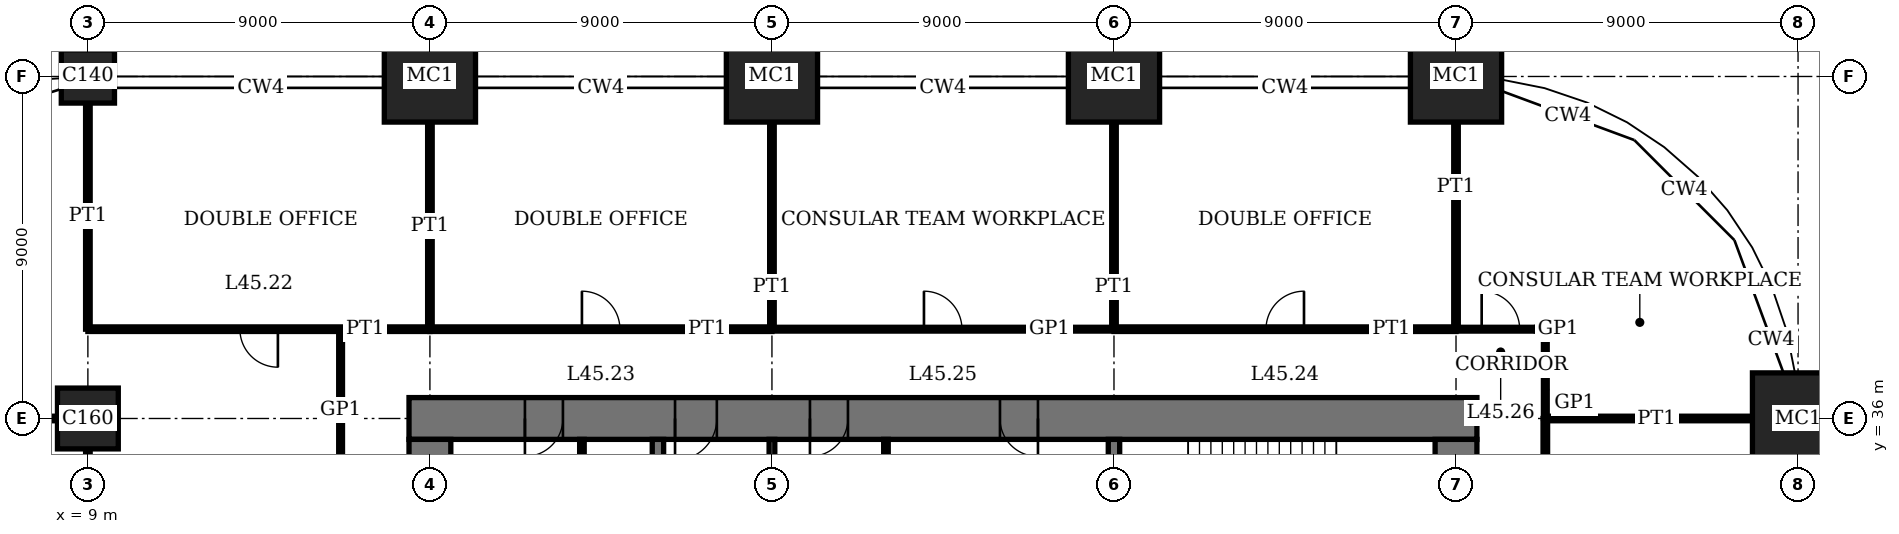
"""IFC4 building model, lengths in metres.
Left out: names, types, materials, properties, quantities, classifications, styles, units other than length and angle.
Written with IfcOpenShell. Run it as: python <this file> out.ifc"""

import sys

from ifc_helpers import new_model, si_unit, direction, frame, frame_2d, origin, origin_2d, place, context, subcontext, project, spatial, rectangle, extrude, element, fill, save


model = new_model("IFC4")
c1 = context("Model", 3, precision=1e-05, world=origin(), true_north=direction((0.0, 1.0)))
c2 = subcontext(c1, "Body", "Model", "MODEL_VIEW")
j1 = project(units=[si_unit("LENGTHUNIT", "METRE"), si_unit("PLANEANGLEUNIT", "RADIAN")], contexts=[c1])
p1 = place(None, origin())
s1 = spatial("IfcSite", under=j1, at=p1, CompositionType="ELEMENT")
p2 = place(p1, origin())
s2 = spatial("IfcBuilding", under=s1, at=p2, CompositionType="ELEMENT")
p3 = place(p2, frame((0.0, 0.0, 186.2)))
s3 = spatial("IfcBuildingStorey", under=s2, at=p3, CompositionType="ELEMENT", Elevation=186.2)
p4 = place(p3, frame((9.0, 36.0, 0.0), z_axis=(0.0, 0.0, 1.0), x_axis=(1.0, 0.0, 0.0)))
e1 = element("IfcColumn", 1, at=p4, inside=s3, PredefinedType="COLUMN", context=c2, shape_type="SweptSolid", body=[
    extrude(rectangle(XDim=1.6, YDim=1.6, at=origin_2d()), origin(), (0.0, 0.0, 1.0), 4.0),
])
p5 = place(p3, frame((9.0, 45.0, 0.0), z_axis=(0.0, 0.0, 1.0), x_axis=(1.0, 0.0, 0.0)))
e2 = element("IfcColumn", 2, at=p5, inside=s3, PredefinedType="COLUMN", context=c2, shape_type="SweptSolid", body=[
    extrude(rectangle(XDim=1.4, YDim=1.4, at=origin_2d()), origin(), (0.0, 0.0, 1.0), 4.0),
])
for number, where, z_axis, x_axis in (
    (3, (18.0, 45.0, 0.0), (0.0, 0.0, 1.0), (1.0, 0.0, 0.0)),
    (4, (27.0, 45.0, 0.0), (0.0, 0.0, 1.0), (1.0, 0.0, 0.0)),
    (5, (36.0, 45.0, 0.0), (0.0, 0.0, 1.0), (1.0, 0.0, 0.0)),
    (6, (45.0, 45.0, 0.0), (0.0, 0.0, 1.0), (1.0, 0.0, 0.0)),
    (7, (54.0, 36.0, 0.0), (0.0, 0.0, 1.0), (1.0, 0.0, 0.0)),
):
    element("IfcColumn", number, at=place(p3, frame(where, z_axis=z_axis, x_axis=x_axis)), inside=s3, PredefinedType="COLUMN", context=c2, shape_type="SweptSolid", body=[
        extrude(rectangle(XDim=2.4, YDim=2.4, at=origin_2d()), origin(), (0.0, 0.0, 1.0), 4.0),
    ])
p6 = place(p3, frame((45.55, 36.0, 0.0), z_axis=(0.0, 0.0, 1.0), x_axis=(-1.0, 0.0, 0.0)))
e8 = element("IfcWall", 8, at=p6, inside=s3, PredefinedType="SHEAR", context=c2, shape_type="SweptSolid", body=[
    extrude(rectangle(XDim=28.1, YDim=1.1, at=frame_2d((14.05, 0.0))), origin(), (0.0, 0.0, 1.0), 4.0),
])
p7 = place(p6, frame((11.55, 0.0, 0.0)))
e9 = element("IfcOpeningElement", 9, at=p7, cuts=e8, PredefinedType="OPENING", context=c2, shape_type="SweptSolid", body=[
    extrude(rectangle(XDim=1.0, YDim=2.4, at=frame_2d((0.5, 1.2))), frame((0.0, 0.56, 0.0), z_axis=(0.0, -1.0, 0.0), x_axis=(1.0, 0.0, 0.0)), (0.0, 0.0, 1.0), 1.12),
])
p8 = place(p6, frame((16.55, 0.0, 0.0)))
e10 = element("IfcOpeningElement", 10, at=p8, cuts=e8, PredefinedType="OPENING", context=c2, shape_type="SweptSolid", body=[
    extrude(rectangle(XDim=1.0, YDim=2.4, at=frame_2d((0.5, 1.2))), frame((0.0, 0.56, 0.0), z_axis=(0.0, -1.0, 0.0), x_axis=(1.0, 0.0, 0.0)), (0.0, 0.0, 1.0), 1.12),
])
p9 = place(p6, frame((20.0, 0.0, 0.0)))
e11 = element("IfcOpeningElement", 11, at=p9, cuts=e8, PredefinedType="OPENING", context=c2, shape_type="SweptSolid", body=[
    extrude(rectangle(XDim=1.1, YDim=2.4, at=frame_2d((0.55, 1.2))), frame((0.0, 0.56, 0.0), z_axis=(0.0, -1.0, 0.0), x_axis=(1.0, 0.0, 0.0)), (0.0, 0.0, 1.0), 1.12),
])
p10 = place(p6, frame((24.05, 0.0, 0.0)))
e12 = element("IfcOpeningElement", 12, at=p10, cuts=e8, PredefinedType="OPENING", context=c2, shape_type="SweptSolid", body=[
    extrude(rectangle(XDim=1.0, YDim=2.4, at=frame_2d((0.5, 1.2))), frame((0.0, 0.56, 0.0), z_axis=(0.0, -1.0, 0.0), x_axis=(1.0, 0.0, 0.0)), (0.0, 0.0, 1.0), 1.12),
])
p11 = place(p3, frame((18.0, 35.45, 0.0), z_axis=(0.0, 0.0, 1.0), x_axis=(0.0, -1.0, 0.0)))
e13 = element("IfcWall", 13, at=p11, inside=s3, PredefinedType="SHEAR", context=c2, shape_type="SweptSolid", body=[
    extrude(rectangle(XDim=16.9, YDim=1.1, at=frame_2d((8.45, 0.0))), origin(), (0.0, 0.0, 1.0), 4.0),
])
p12 = place(p11, frame((8.45, 0.0, 0.0)))
e14 = element("IfcOpeningElement", 14, at=p12, cuts=e13, PredefinedType="OPENING", context=c2, shape_type="SweptSolid", body=[
    extrude(rectangle(XDim=1.8, YDim=2.4, at=frame_2d((0.9, 1.2))), frame((0.0, 0.56, 0.0), z_axis=(0.0, -1.0, 0.0), x_axis=(1.0, 0.0, 0.0)), (0.0, 0.0, 1.0), 1.12),
])
p13 = place(p3, frame((45.0, 18.55, 0.0), z_axis=(0.0, 0.0, 1.0), x_axis=(0.0, 1.0, 0.0)))
e15 = element("IfcWall", 15, at=p13, inside=s3, PredefinedType="SHEAR", context=c2, shape_type="SweptSolid", body=[
    extrude(rectangle(XDim=16.9, YDim=1.1, at=frame_2d((8.45, 0.0))), origin(), (0.0, 0.0, 1.0), 4.0),
])
p14 = place(p13, frame((8.45, 0.0, 0.0)))
e16 = element("IfcOpeningElement", 16, at=p14, cuts=e15, PredefinedType="OPENING", context=c2, shape_type="SweptSolid", body=[
    extrude(rectangle(XDim=1.8, YDim=2.4, at=frame_2d((0.9, 1.2))), frame((0.0, 0.56, 0.0), z_axis=(0.0, -1.0, 0.0), x_axis=(1.0, 0.0, 0.0)), (0.0, 0.0, 1.0), 1.12),
])
p15 = place(p3, frame((36.0, 32.4, 0.0), z_axis=(0.0, 0.0, 1.0), x_axis=(0.0, 1.0, 0.0)))
e17 = element("IfcWall", 17, at=p15, inside=s3, PredefinedType="SHEAR", context=c2, shape_type="SweptSolid", body=[
    extrude(rectangle(XDim=3.05, YDim=0.3, at=frame_2d((1.525, 0.0))), origin(), (0.0, 0.0, 1.0), 4.0),
])
p16 = place(p3, frame((24.0, 29.55, 0.0), z_axis=(0.0, 0.0, 1.0), x_axis=(0.0, 1.0, 0.0)))
e18 = element("IfcWall", 18, at=p16, inside=s3, PredefinedType="SHEAR", context=c2, shape_type="SweptSolid", body=[
    extrude(rectangle(XDim=5.9, YDim=0.3, at=frame_2d((2.95, 0.0))), origin(), (0.0, 0.0, 1.0), 4.0),
])
p17 = place(p3, frame((47.35, 36.0, 0.0), z_axis=(0.0, 0.0, 1.0), x_axis=(1.0, 0.0, 0.0)))
e19 = element("IfcWall", 19, at=p17, inside=s3, PredefinedType="PARTITIONING", context=c2, shape_type="SweptSolid", body=[
    extrude(rectangle(XDim=5.45, YDim=0.12, at=frame_2d((2.725, 0.0))), origin(), (0.0, 0.0, 1.0), 3.05),
])
p18 = place(p3, frame((1.2, 36.0, 0.0), z_axis=(0.0, 0.0, 1.0), x_axis=(1.0, 0.0, 0.0)))
e20 = element("IfcWall", 20, at=p18, inside=s3, PredefinedType="PARTITIONING", context=c2, shape_type="SweptSolid", body=[
    extrude(rectangle(XDim=7.0, YDim=0.12, at=frame_2d((3.5, 0.0))), origin(), (0.0, 0.0, 1.0), 3.05),
])
p19 = place(p3, frame((9.0, 38.35, 0.0), z_axis=(0.0, 0.0, 1.0), x_axis=(1.0, 0.0, 0.0)))
e21 = element("IfcWall", 21, at=p19, inside=s3, PredefinedType="PARTITIONING", context=c2, shape_type="SweptSolid", body=[
    extrude(rectangle(XDim=9.0, YDim=0.12, at=frame_2d((4.5, 0.0))), origin(), (0.0, 0.0, 1.0), 3.75),
])
p20 = place(p19, frame((4.0, 0.0, 0.0)))
e22 = element("IfcOpeningElement", 22, at=p20, cuts=e21, PredefinedType="OPENING", context=c2, shape_type="SweptSolid", body=[
    extrude(rectangle(XDim=1.0, YDim=2.4, at=frame_2d((0.5, 1.2))), frame((0.0, 0.07, 0.0), z_axis=(0.0, -1.0, 0.0), x_axis=(1.0, 0.0, 0.0)), (0.0, 0.0, 1.0), 0.14),
])
p21 = place(p3, frame((18.0, 38.35, 0.0), z_axis=(0.0, 0.0, 1.0), x_axis=(1.0, 0.0, 0.0)))
e23 = element("IfcWall", 23, at=p21, inside=s3, PredefinedType="PARTITIONING", context=c2, shape_type="SweptSolid", body=[
    extrude(rectangle(XDim=9.0, YDim=0.12, at=frame_2d((4.5, 0.0))), origin(), (0.0, 0.0, 1.0), 3.75),
])
p22 = place(p21, frame((4.0, 0.0, 0.0)))
e24 = element("IfcOpeningElement", 24, at=p22, cuts=e23, PredefinedType="OPENING", context=c2, shape_type="SweptSolid", body=[
    extrude(rectangle(XDim=1.0, YDim=2.4, at=frame_2d((0.5, 1.2))), frame((0.0, 0.07, 0.0), z_axis=(0.0, -1.0, 0.0), x_axis=(1.0, 0.0, 0.0)), (0.0, 0.0, 1.0), 0.14),
])
p23 = place(p3, frame((36.0, 38.35, 0.0), z_axis=(0.0, 0.0, 1.0), x_axis=(1.0, 0.0, 0.0)))
e25 = element("IfcWall", 25, at=p23, inside=s3, PredefinedType="PARTITIONING", context=c2, shape_type="SweptSolid", body=[
    extrude(rectangle(XDim=9.0, YDim=0.12, at=frame_2d((4.5, 0.0))), origin(), (0.0, 0.0, 1.0), 3.75),
])
p24 = place(p23, frame((4.0, 0.0, 0.0)))
e26 = element("IfcOpeningElement", 26, at=p24, cuts=e25, PredefinedType="OPENING", context=c2, shape_type="SweptSolid", body=[
    extrude(rectangle(XDim=1.0, YDim=2.4, at=frame_2d((0.5, 1.2))), frame((0.0, 0.07, 0.0), z_axis=(0.0, -1.0, 0.0), x_axis=(1.0, 0.0, 0.0)), (0.0, 0.0, 1.0), 0.14),
])
p25 = place(p3, frame((27.0, 38.35, 0.0), z_axis=(0.0, 0.0, 1.0), x_axis=(1.0, 0.0, 0.0)))
e27 = element("IfcWall", 27, at=p25, inside=s3, PredefinedType="PARTITIONING", context=c2, shape_type="SweptSolid", body=[
    extrude(rectangle(XDim=9.0, YDim=0.1, at=frame_2d((4.5, 0.0))), origin(), (0.0, 0.0, 1.0), 3.75),
])
p26 = place(p25, frame((4.0, 0.0, 0.0)))
e28 = element("IfcOpeningElement", 28, at=p26, cuts=e27, PredefinedType="OPENING", context=c2, shape_type="SweptSolid", body=[
    extrude(rectangle(XDim=1.0, YDim=2.4, at=frame_2d((0.5, 1.2))), frame((0.0, 0.06, 0.0), z_axis=(0.0, -1.0, 0.0), x_axis=(1.0, 0.0, 0.0)), (0.0, 0.0, 1.0), 0.12),
])
p27 = place(p3, frame((45.0, 38.35, 0.0), z_axis=(0.0, 0.0, 1.0), x_axis=(1.0, 0.0, 0.0)))
e29 = element("IfcWall", 29, at=p27, inside=s3, PredefinedType="PARTITIONING", context=c2, shape_type="SweptSolid", body=[
    extrude(rectangle(XDim=2.35, YDim=0.1, at=frame_2d((1.175, 0.0))), origin(), (0.0, 0.0, 1.0), 3.75),
])
p28 = place(p27, frame((0.675, 0.0, 0.0)))
e30 = element("IfcOpeningElement", 30, at=p28, cuts=e29, PredefinedType="OPENING", context=c2, shape_type="SweptSolid", body=[
    extrude(rectangle(XDim=1.0, YDim=2.4, at=frame_2d((0.5, 1.2))), frame((0.0, 0.06, 0.0), z_axis=(0.0, -1.0, 0.0), x_axis=(1.0, 0.0, 0.0)), (0.0, 0.0, 1.0), 0.12),
])
p29 = place(p3, frame((9.0, 38.35, 0.0), z_axis=(0.0, 0.0, 1.0), x_axis=(0.0, 1.0, 0.0)))
e31 = element("IfcWall", 31, at=p29, inside=s3, PredefinedType="PARTITIONING", context=c2, shape_type="SweptSolid", body=[
    extrude(rectangle(XDim=5.95, YDim=0.12, at=frame_2d((2.975, 0.0))), origin(), (0.0, 0.0, 1.0), 3.05),
])
p30 = place(p3, frame((9.0, 27.8, 0.0), z_axis=(0.0, 0.0, 1.0), x_axis=(0.0, 1.0, 0.0)))
e32 = element("IfcWall", 32, at=p30, inside=s3, PredefinedType="PARTITIONING", context=c2, shape_type="SweptSolid", body=[
    extrude(rectangle(XDim=7.4, YDim=0.12, at=frame_2d((3.7, 0.0))), origin(), (0.0, 0.0, 1.0), 3.05),
])
p31 = place(p30, frame((3.2, 0.0, 0.0)))
e33 = element("IfcOpeningElement", 33, at=p31, cuts=e32, PredefinedType="OPENING", context=c2, shape_type="SweptSolid", body=[
    extrude(rectangle(XDim=1.0, YDim=2.4, at=frame_2d((0.5, 1.2))), frame((0.0, 0.07, 0.0), z_axis=(0.0, -1.0, 0.0), x_axis=(1.0, 0.0, 0.0)), (0.0, 0.0, 1.0), 0.14),
])
p32 = place(p3, frame((15.65, 31.5, 0.0), z_axis=(0.0, 0.0, 1.0), x_axis=(0.0, 1.0, 0.0)))
e34 = element("IfcWall", 34, at=p32, inside=s3, PredefinedType="PARTITIONING", context=c2, shape_type="SweptSolid", body=[
    extrude(rectangle(XDim=6.85, YDim=0.1, at=frame_2d((3.425, 0.0))), origin(), (0.0, 0.0, 1.0), 3.75),
])
for number, where, z_axis, x_axis in (
    (35, (18.0, 38.35, 0.0), (0.0, 0.0, 1.0), (0.0, 1.0, 0.0)),
    (36, (27.0, 38.35, 0.0), (0.0, 0.0, 1.0), (0.0, 1.0, 0.0)),
    (37, (36.0, 38.35, 0.0), (0.0, 0.0, 1.0), (0.0, 1.0, 0.0)),
    (38, (45.0, 38.35, 0.0), (0.0, 0.0, 1.0), (0.0, 1.0, 0.0)),
):
    element("IfcWall", number, at=place(p3, frame(where, z_axis=z_axis, x_axis=x_axis)), inside=s3, PredefinedType="PARTITIONING", context=c2, shape_type="SweptSolid", body=[
        extrude(rectangle(XDim=5.45, YDim=0.12, at=frame_2d((2.725, 0.0))), origin(), (0.0, 0.0, 1.0), 3.05),
    ])
p33 = place(p3, frame((47.35, 27.0, 0.0), z_axis=(0.0, 0.0, 1.0), x_axis=(0.0, 1.0, 0.0)))
e39 = element("IfcWall", 39, at=p33, inside=s3, PredefinedType="PARTITIONING", context=c2, shape_type="SweptSolid", body=[
    extrude(rectangle(XDim=9.0, YDim=0.12, at=frame_2d((4.5, 0.0))), origin(), (0.0, 0.0, 1.0), 3.75),
])
p34 = place(p33, frame((4.0, 0.0, 0.0)))
e40 = element("IfcOpeningElement", 40, at=p34, cuts=e39, PredefinedType="OPENING", context=c2, shape_type="SweptSolid", body=[
    extrude(rectangle(XDim=1.0, YDim=2.4, at=frame_2d((0.5, 1.2))), frame((0.0, 0.07, 0.0), z_axis=(0.0, -1.0, 0.0), x_axis=(1.0, 0.0, 0.0)), (0.0, 0.0, 1.0), 0.14),
])
p35 = place(p3, frame((47.35, 36.0, 0.0), z_axis=(0.0, 0.0, 1.0), x_axis=(0.0, 1.0, 0.0)))
e41 = element("IfcWall", 41, at=p35, inside=s3, PredefinedType="PARTITIONING", context=c2, shape_type="SweptSolid", body=[
    extrude(rectangle(XDim=2.35, YDim=0.1, at=frame_2d((1.175, 0.0))), origin(), (0.0, 0.0, 1.0), 3.75),
])
p36 = place(p3, frame((30.0, 32.55, 0.0), z_axis=(0.0, 0.0, 1.0), x_axis=(0.0, 1.0, 0.0)))
e42 = element("IfcWall", 42, at=p36, inside=s3, PredefinedType="PARTITIONING", context=c2, shape_type="SweptSolid", body=[
    extrude(rectangle(XDim=2.9, YDim=0.12, at=frame_2d((1.45, 0.0))), origin(), (0.0, 0.0, 1.0), 3.75),
])
p37 = place(p3, frame((27.0, 32.55, 0.0), z_axis=(0.0, 0.0, 1.0), x_axis=(0.0, 1.0, 0.0)))
e43 = element("IfcWall", 43, at=p37, inside=s3, PredefinedType="PARTITIONING", context=c2, shape_type="SweptSolid", body=[
    extrude(rectangle(XDim=2.9, YDim=0.15, at=frame_2d((1.45, 0.0))), origin(), (0.0, 0.0, 1.0), 3.75),
])
p38 = place(p3, frame((22.0, 32.55, 0.0), z_axis=(0.0, 0.0, 1.0), x_axis=(0.0, 1.0, 0.0)))
e44 = element("IfcWall", 44, at=p38, inside=s3, PredefinedType="PARTITIONING", context=c2, shape_type="SweptSolid", body=[
    extrude(rectangle(XDim=2.9, YDim=0.12, at=frame_2d((1.45, 0.0))), origin(), (0.0, 0.0, 1.0), 3.75),
])
p39 = place(p38, frame((0.95, 0.0, 0.0)))
e45 = element("IfcOpeningElement", 45, at=p39, cuts=e44, PredefinedType="OPENING", context=c2, shape_type="SweptSolid", body=[
    extrude(rectangle(XDim=1.0, YDim=2.4, at=frame_2d((0.5, 1.2))), frame((0.0, 0.07, 0.0), z_axis=(0.0, -1.0, 0.0), x_axis=(1.0, 0.0, 0.0)), (0.0, 0.0, 1.0), 0.14),
])
p40 = place(p7, origin())
e46 = element("IfcDoor", 46, at=p40, inside=s3, OperationType="SINGLE_SWING_RIGHT", PredefinedType="DOOR", context=c2, shape_type="SweptSolid", body=[
    extrude(rectangle(XDim=1.0, YDim=2.4, at=frame_2d((0.5, 1.2))), frame((0.0, 0.025, 0.0), z_axis=(0.0, -1.0, 0.0), x_axis=(1.0, 0.0, 0.0)), (0.0, 0.0, 1.0), 0.05),
    extrude(rectangle(XDim=0.04, YDim=2.4, at=frame_2d((0.02, 1.2))), frame((0.0, 0.4, 0.0), z_axis=(0.0, -1.0, 0.0), x_axis=(1.0, 0.0, 0.0)), (0.0, 0.0, 1.0), 0.8),
    extrude(rectangle(XDim=0.04, YDim=2.4, at=frame_2d((0.98, 1.2))), frame((0.0, 0.4, 0.0), z_axis=(0.0, -1.0, 0.0), x_axis=(1.0, 0.0, 0.0)), (0.0, 0.0, 1.0), 0.8),
    extrude(rectangle(XDim=1.0, YDim=0.04, at=frame_2d((0.5, 2.38))), frame((0.0, 0.4, 0.0), z_axis=(0.0, -1.0, 0.0), x_axis=(1.0, 0.0, 0.0)), (0.0, 0.0, 1.0), 0.8),
])
fill(e9, e46)
p41 = place(p8, origin())
e47 = element("IfcDoor", 47, at=p41, inside=s3, OperationType="SINGLE_SWING_LEFT", PredefinedType="DOOR", context=c2, shape_type="SweptSolid", body=[
    extrude(rectangle(XDim=1.0, YDim=2.4, at=frame_2d((0.5, 1.2))), frame((0.0, 0.025, 0.0), z_axis=(0.0, -1.0, 0.0), x_axis=(1.0, 0.0, 0.0)), (0.0, 0.0, 1.0), 0.05),
    extrude(rectangle(XDim=0.04, YDim=2.4, at=frame_2d((0.02, 1.2))), frame((0.0, 0.4, 0.0), z_axis=(0.0, -1.0, 0.0), x_axis=(1.0, 0.0, 0.0)), (0.0, 0.0, 1.0), 0.8),
    extrude(rectangle(XDim=0.04, YDim=2.4, at=frame_2d((0.98, 1.2))), frame((0.0, 0.4, 0.0), z_axis=(0.0, -1.0, 0.0), x_axis=(1.0, 0.0, 0.0)), (0.0, 0.0, 1.0), 0.8),
    extrude(rectangle(XDim=1.0, YDim=0.04, at=frame_2d((0.5, 2.38))), frame((0.0, 0.4, 0.0), z_axis=(0.0, -1.0, 0.0), x_axis=(1.0, 0.0, 0.0)), (0.0, 0.0, 1.0), 0.8),
])
fill(e10, e47)
p42 = place(p9, origin())
e48 = element("IfcDoor", 48, at=p42, inside=s3, OperationType="SINGLE_SWING_LEFT", PredefinedType="DOOR", context=c2, shape_type="SweptSolid", body=[
    extrude(rectangle(XDim=1.1, YDim=2.4, at=frame_2d((0.55, 1.2))), frame((0.0, 0.025, 0.0), z_axis=(0.0, -1.0, 0.0), x_axis=(1.0, 0.0, 0.0)), (0.0, 0.0, 1.0), 0.05),
    extrude(rectangle(XDim=0.04, YDim=2.4, at=frame_2d((0.02, 1.2))), frame((0.0, 0.44, 0.0), z_axis=(0.0, -1.0, 0.0), x_axis=(1.0, 0.0, 0.0)), (0.0, 0.0, 1.0), 0.88),
    extrude(rectangle(XDim=0.04, YDim=2.4, at=frame_2d((1.08, 1.2))), frame((0.0, 0.44, 0.0), z_axis=(0.0, -1.0, 0.0), x_axis=(1.0, 0.0, 0.0)), (0.0, 0.0, 1.0), 0.88),
    extrude(rectangle(XDim=1.1, YDim=0.04, at=frame_2d((0.55, 2.38))), frame((0.0, 0.44, 0.0), z_axis=(0.0, -1.0, 0.0), x_axis=(1.0, 0.0, 0.0)), (0.0, 0.0, 1.0), 0.88),
])
fill(e11, e48)
p43 = place(p10, origin())
e49 = element("IfcDoor", 49, at=p43, inside=s3, OperationType="SINGLE_SWING_LEFT", PredefinedType="DOOR", context=c2, shape_type="SweptSolid", body=[
    extrude(rectangle(XDim=1.0, YDim=2.4, at=frame_2d((0.5, 1.2))), frame((0.0, 0.025, 0.0), z_axis=(0.0, -1.0, 0.0), x_axis=(1.0, 0.0, 0.0)), (0.0, 0.0, 1.0), 0.05),
    extrude(rectangle(XDim=0.04, YDim=2.4, at=frame_2d((0.02, 1.2))), frame((0.0, 0.4, 0.0), z_axis=(0.0, -1.0, 0.0), x_axis=(1.0, 0.0, 0.0)), (0.0, 0.0, 1.0), 0.8),
    extrude(rectangle(XDim=0.04, YDim=2.4, at=frame_2d((0.98, 1.2))), frame((0.0, 0.4, 0.0), z_axis=(0.0, -1.0, 0.0), x_axis=(1.0, 0.0, 0.0)), (0.0, 0.0, 1.0), 0.8),
    extrude(rectangle(XDim=1.0, YDim=0.04, at=frame_2d((0.5, 2.38))), frame((0.0, 0.4, 0.0), z_axis=(0.0, -1.0, 0.0), x_axis=(1.0, 0.0, 0.0)), (0.0, 0.0, 1.0), 0.8),
])
fill(e12, e49)
p44 = place(p20, origin())
e50 = element("IfcDoor", 50, at=p44, inside=s3, OperationType="SINGLE_SWING_RIGHT", PredefinedType="DOOR", context=c2, shape_type="SweptSolid", body=[
    extrude(rectangle(XDim=1.0, YDim=2.4, at=frame_2d((0.5, 1.2))), frame((0.0, 0.025, 0.0), z_axis=(0.0, -1.0, 0.0), x_axis=(1.0, 0.0, 0.0)), (0.0, 0.0, 1.0), 0.05),
])
fill(e22, e50)
p45 = place(p22, origin())
e51 = element("IfcDoor", 51, at=p45, inside=s3, OperationType="SINGLE_SWING_RIGHT", PredefinedType="DOOR", context=c2, shape_type="SweptSolid", body=[
    extrude(rectangle(XDim=1.0, YDim=2.4, at=frame_2d((0.5, 1.2))), frame((0.0, 0.025, 0.0), z_axis=(0.0, -1.0, 0.0), x_axis=(1.0, 0.0, 0.0)), (0.0, 0.0, 1.0), 0.05),
])
fill(e24, e51)
p46 = place(p24, origin())
e52 = element("IfcDoor", 52, at=p46, inside=s3, OperationType="SINGLE_SWING_LEFT", PredefinedType="DOOR", context=c2, shape_type="SweptSolid", body=[
    extrude(rectangle(XDim=1.0, YDim=2.4, at=frame_2d((0.5, 1.2))), frame((0.0, 0.025, 0.0), z_axis=(0.0, -1.0, 0.0), x_axis=(1.0, 0.0, 0.0)), (0.0, 0.0, 1.0), 0.05),
])
fill(e26, e52)
p47 = place(p26, origin())
e53 = element("IfcDoor", 53, at=p47, inside=s3, OperationType="SINGLE_SWING_RIGHT", PredefinedType="DOOR", context=c2, shape_type="SweptSolid", body=[
    extrude(rectangle(XDim=1.0, YDim=2.4, at=frame_2d((0.5, 1.2))), frame((0.0, 0.02, 0.0), z_axis=(0.0, -1.0, 0.0), x_axis=(1.0, 0.0, 0.0)), (0.0, 0.0, 1.0), 0.04),
])
fill(e28, e53)
p48 = place(p28, origin())
e54 = element("IfcDoor", 54, at=p48, inside=s3, OperationType="SINGLE_SWING_RIGHT", PredefinedType="DOOR", context=c2, shape_type="SweptSolid", body=[
    extrude(rectangle(XDim=1.0, YDim=2.4, at=frame_2d((0.5, 1.2))), frame((0.0, 0.02, 0.0), z_axis=(0.0, -1.0, 0.0), x_axis=(1.0, 0.0, 0.0)), (0.0, 0.0, 1.0), 0.04),
])
fill(e30, e54)
save(model, sys.argv[1])
